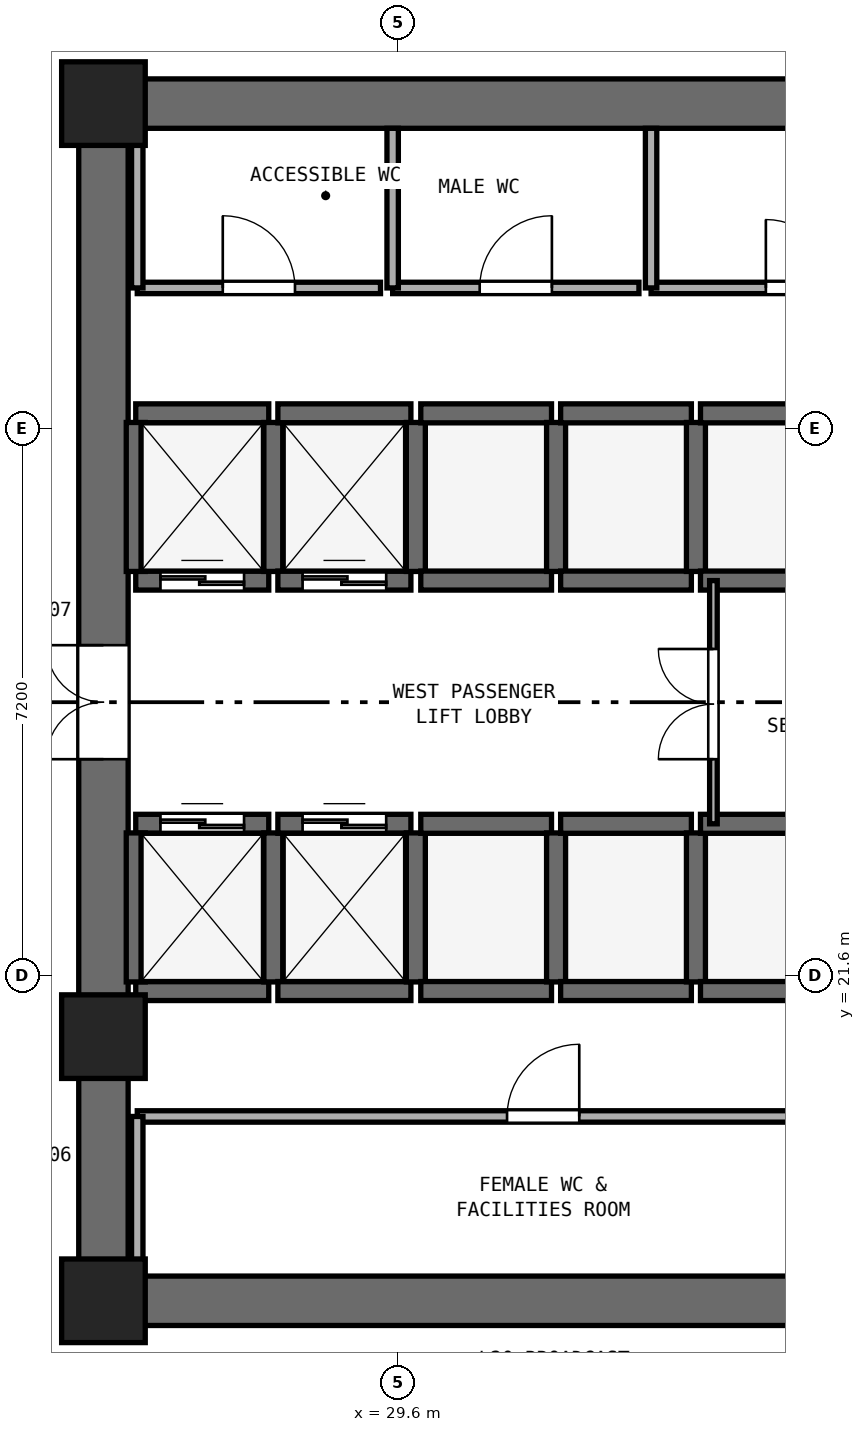
"""IFC4 building model, lengths in metres.
Left out: names, types, materials, properties, quantities, classifications, styles, units other than length and angle.
Written with IfcOpenShell. Run it as: python <this file> out.ifc"""

import sys

from ifc_helpers import new_model, si_unit, direction, frame, frame_2d, origin, origin_2d, place, context, subcontext, project, spatial, rectangle, extrude, element, fill, save


model = new_model("IFC4")
c1 = context("Model", 3, precision=1e-05, world=origin(), true_north=direction((0.0, 1.0)))
c2 = subcontext(c1, "Body", "Model", "MODEL_VIEW")
j1 = project(units=[si_unit("LENGTHUNIT", "METRE"), si_unit("PLANEANGLEUNIT", "RADIAN")], contexts=[c1])
p1 = place(None, origin())
s1 = spatial("IfcSite", under=j1, at=p1, CompositionType="ELEMENT")
p2 = place(p1, origin())
s2 = spatial("IfcBuilding", under=s1, at=p2, CompositionType="ELEMENT")
p3 = place(p2, frame((0.0, 0.0, 82.0)))
s3 = spatial("IfcBuildingStorey", under=s2, at=p3, CompositionType="ELEMENT", Elevation=82.0)
for number, where, z_axis, x_axis in (
    (1, (25.4, 17.325, 0.0), (0.0, 0.0, 1.0), (1.0, 0.0, 0.0)),
    (2, (25.4, 33.075, 0.0), (0.0, 0.0, 1.0), (1.0, 0.0, 0.0)),
):
    element("IfcWall", number, at=place(p3, frame(where, z_axis=z_axis, x_axis=x_axis)), inside=s3, PredefinedType="SHEAR", context=c2, shape_type="SweptSolid", body=[
        extrude(rectangle(XDim=23.2, YDim=0.65, at=frame_2d((11.6, 0.0))), origin(), (0.0, 0.0, 1.0), 3.525),
    ])
p4 = place(p3, frame((25.725, 17.65, 0.0), z_axis=(0.0, 0.0, 1.0), x_axis=(0.0, 1.0, 0.0)))
e3 = element("IfcWall", 3, at=p4, inside=s3, PredefinedType="SHEAR", context=c2, shape_type="SweptSolid", body=[
    extrude(rectangle(XDim=15.1, YDim=0.65, at=frame_2d((7.55, 0.0))), origin(), (0.0, 0.0, 1.0), 3.525),
])
p5 = place(p4, frame((6.8, 0.0, 0.0)))
e4 = element("IfcOpeningElement", 4, at=p5, cuts=e3, PredefinedType="OPENING", context=c2, shape_type="SweptSolid", body=[
    extrude(rectangle(XDim=1.5, YDim=2.15, at=frame_2d((0.75, 1.075))), frame((0.0, 0.335, 0.0), z_axis=(0.0, -1.0, 0.0), x_axis=(1.0, 0.0, 0.0)), (0.0, 0.0, 1.0), 0.67),
])
for number, where, z_axis, x_axis in (
    (5, (25.725, 17.325, 0.0), (0.0, 0.0, 1.0), (1.0, 0.0, 0.0)),
    (6, (25.725, 33.075, 0.0), (0.0, 0.0, 1.0), (1.0, 0.0, 0.0)),
    (7, (25.725, 20.8, 0.0), (0.0, 0.0, 1.0), (1.0, 0.0, 0.0)),
):
    element("IfcColumn", number, at=place(p3, frame(where, z_axis=z_axis, x_axis=x_axis)), inside=s3, PredefinedType="PILASTER", context=c2, shape_type="SweptSolid", body=[
        extrude(rectangle(XDim=1.1, YDim=1.1, at=origin_2d()), origin(), (0.0, 0.0, 1.0), 3.8),
    ])
p6 = place(p3, frame((26.15, 26.8, 0.0), z_axis=(0.0, 0.0, 1.0), x_axis=(1.0, 0.0, 0.0)))
e8 = element("IfcWall", 8, at=p6, inside=s3, PredefinedType="SHEAR", context=c2, shape_type="SweptSolid", body=[
    extrude(rectangle(XDim=1.75, YDim=0.25, at=frame_2d((0.875, 0.0))), origin(), (0.0, 0.0, 1.0), 3.525),
])
p7 = place(p6, frame((0.325, 0.0, 0.0)))
e9 = element("IfcOpeningElement", 9, at=p7, cuts=e8, PredefinedType="OPENING", context=c2, shape_type="SweptSolid", body=[
    extrude(rectangle(XDim=1.1, YDim=2.15, at=frame_2d((0.55, 1.075))), frame((0.0, 0.135, 0.0), z_axis=(0.0, -1.0, 0.0), x_axis=(1.0, 0.0, 0.0)), (0.0, 0.0, 1.0), 0.27),
])
p8 = place(p3, frame((26.15, 29.0, 0.0), z_axis=(0.0, 0.0, 1.0), x_axis=(1.0, 0.0, 0.0)))
e10 = element("IfcWall", 10, at=p8, inside=s3, PredefinedType="SHEAR", context=c2, shape_type="SweptSolid", body=[
    extrude(rectangle(XDim=1.75, YDim=0.25, at=frame_2d((0.875, 0.0))), origin(), (0.0, 0.0, 1.0), 3.525),
])
for number, where, z_axis, x_axis in (
    (11, (26.15, 26.92, 0.0), (0.0, 0.0, 1.0), (0.0, 1.0, 0.0)),
    (12, (27.96, 26.92, 0.0), (0.0, 0.0, 1.0), (0.0, 1.0, 0.0)),
):
    element("IfcWall", number, at=place(p3, frame(where, z_axis=z_axis, x_axis=x_axis)), inside=s3, PredefinedType="SHEAR", context=c2, shape_type="SweptSolid", body=[
        extrude(rectangle(XDim=1.96, YDim=0.25, at=frame_2d((0.98, 0.0))), origin(), (0.0, 0.0, 1.0), 3.525),
    ])
p9 = place(p3, frame((28.02, 26.8, 0.0), z_axis=(0.0, 0.0, 1.0), x_axis=(1.0, 0.0, 0.0)))
e13 = element("IfcWall", 13, at=p9, inside=s3, PredefinedType="SHEAR", context=c2, shape_type="SweptSolid", body=[
    extrude(rectangle(XDim=1.75, YDim=0.25, at=frame_2d((0.875, 0.0))), origin(), (0.0, 0.0, 1.0), 3.525),
])
p10 = place(p9, frame((0.325, 0.0, 0.0)))
e14 = element("IfcOpeningElement", 14, at=p10, cuts=e13, PredefinedType="OPENING", context=c2, shape_type="SweptSolid", body=[
    extrude(rectangle(XDim=1.1, YDim=2.15, at=frame_2d((0.55, 1.075))), frame((0.0, 0.135, 0.0), z_axis=(0.0, -1.0, 0.0), x_axis=(1.0, 0.0, 0.0)), (0.0, 0.0, 1.0), 0.27),
])
p11 = place(p3, frame((28.02, 29.0, 0.0), z_axis=(0.0, 0.0, 1.0), x_axis=(1.0, 0.0, 0.0)))
e15 = element("IfcWall", 15, at=p11, inside=s3, PredefinedType="SHEAR", context=c2, shape_type="SweptSolid", body=[
    extrude(rectangle(XDim=1.75, YDim=0.25, at=frame_2d((0.875, 0.0))), origin(), (0.0, 0.0, 1.0), 3.525),
])
p12 = place(p3, frame((29.835, 26.92, 0.0), z_axis=(0.0, 0.0, 1.0), x_axis=(0.0, 1.0, 0.0)))
e16 = element("IfcWall", 16, at=p12, inside=s3, PredefinedType="SHEAR", context=c2, shape_type="SweptSolid", body=[
    extrude(rectangle(XDim=1.96, YDim=0.25, at=frame_2d((0.98, 0.0))), origin(), (0.0, 0.0, 1.0), 3.525),
])
p13 = place(p3, frame((26.15, 21.4, 0.0), z_axis=(0.0, 0.0, 1.0), x_axis=(1.0, 0.0, 0.0)))
e17 = element("IfcWall", 17, at=p13, inside=s3, PredefinedType="SHEAR", context=c2, shape_type="SweptSolid", body=[
    extrude(rectangle(XDim=1.75, YDim=0.25, at=frame_2d((0.875, 0.0))), origin(), (0.0, 0.0, 1.0), 3.525),
])
p14 = place(p3, frame((26.15, 23.6, 0.0), z_axis=(0.0, 0.0, 1.0), x_axis=(1.0, 0.0, 0.0)))
e18 = element("IfcWall", 18, at=p14, inside=s3, PredefinedType="SHEAR", context=c2, shape_type="SweptSolid", body=[
    extrude(rectangle(XDim=1.75, YDim=0.25, at=frame_2d((0.875, 0.0))), origin(), (0.0, 0.0, 1.0), 3.525),
])
p15 = place(p14, frame((0.325, 0.0, 0.0)))
e19 = element("IfcOpeningElement", 19, at=p15, cuts=e18, PredefinedType="OPENING", context=c2, shape_type="SweptSolid", body=[
    extrude(rectangle(XDim=1.1, YDim=2.15, at=frame_2d((0.55, 1.075))), frame((0.0, 0.135, 0.0), z_axis=(0.0, -1.0, 0.0), x_axis=(1.0, 0.0, 0.0)), (0.0, 0.0, 1.0), 0.27),
])
for number, where, z_axis, x_axis in (
    (20, (26.15, 21.52, 0.0), (0.0, 0.0, 1.0), (0.0, 1.0, 0.0)),
    (21, (27.96, 21.52, 0.0), (0.0, 0.0, 1.0), (0.0, 1.0, 0.0)),
):
    element("IfcWall", number, at=place(p3, frame(where, z_axis=z_axis, x_axis=x_axis)), inside=s3, PredefinedType="SHEAR", context=c2, shape_type="SweptSolid", body=[
        extrude(rectangle(XDim=1.96, YDim=0.25, at=frame_2d((0.98, 0.0))), origin(), (0.0, 0.0, 1.0), 3.525),
    ])
p16 = place(p3, frame((28.02, 21.4, 0.0), z_axis=(0.0, 0.0, 1.0), x_axis=(1.0, 0.0, 0.0)))
e22 = element("IfcWall", 22, at=p16, inside=s3, PredefinedType="SHEAR", context=c2, shape_type="SweptSolid", body=[
    extrude(rectangle(XDim=1.75, YDim=0.25, at=frame_2d((0.875, 0.0))), origin(), (0.0, 0.0, 1.0), 3.525),
])
p17 = place(p3, frame((28.02, 23.6, 0.0), z_axis=(0.0, 0.0, 1.0), x_axis=(1.0, 0.0, 0.0)))
e23 = element("IfcWall", 23, at=p17, inside=s3, PredefinedType="SHEAR", context=c2, shape_type="SweptSolid", body=[
    extrude(rectangle(XDim=1.75, YDim=0.25, at=frame_2d((0.875, 0.0))), origin(), (0.0, 0.0, 1.0), 3.525),
])
p18 = place(p17, frame((0.325, 0.0, 0.0)))
e24 = element("IfcOpeningElement", 24, at=p18, cuts=e23, PredefinedType="OPENING", context=c2, shape_type="SweptSolid", body=[
    extrude(rectangle(XDim=1.1, YDim=2.15, at=frame_2d((0.55, 1.075))), frame((0.0, 0.135, 0.0), z_axis=(0.0, -1.0, 0.0), x_axis=(1.0, 0.0, 0.0)), (0.0, 0.0, 1.0), 0.27),
])
p19 = place(p3, frame((29.835, 21.52, 0.0), z_axis=(0.0, 0.0, 1.0), x_axis=(0.0, 1.0, 0.0)))
e25 = element("IfcWall", 25, at=p19, inside=s3, PredefinedType="SHEAR", context=c2, shape_type="SweptSolid", body=[
    extrude(rectangle(XDim=1.96, YDim=0.25, at=frame_2d((0.98, 0.0))), origin(), (0.0, 0.0, 1.0), 3.525),
])
for number, where, z_axis, x_axis in (
    (26, (29.9, 21.4, 0.0), (0.0, 0.0, 1.0), (1.0, 0.0, 0.0)),
    (27, (29.9, 23.6, 0.0), (0.0, 0.0, 1.0), (1.0, 0.0, 0.0)),
):
    element("IfcWall", number, at=place(p3, frame(where, z_axis=z_axis, x_axis=x_axis)), inside=s3, PredefinedType="SHEAR", context=c2, shape_type="SweptSolid", body=[
        extrude(rectangle(XDim=1.72, YDim=0.25, at=frame_2d((0.86, 0.0))), origin(), (0.0, 0.0, 1.0), 3.525),
    ])
p20 = place(p3, frame((31.68, 21.52, 0.0), z_axis=(0.0, 0.0, 1.0), x_axis=(0.0, 1.0, 0.0)))
e28 = element("IfcWall", 28, at=p20, inside=s3, PredefinedType="SHEAR", context=c2, shape_type="SweptSolid", body=[
    extrude(rectangle(XDim=1.96, YDim=0.25, at=frame_2d((0.98, 0.0))), origin(), (0.0, 0.0, 1.0), 3.525),
])
for number, where, z_axis, x_axis in (
    (29, (31.74, 21.4, 0.0), (0.0, 0.0, 1.0), (1.0, 0.0, 0.0)),
    (30, (31.74, 23.6, 0.0), (0.0, 0.0, 1.0), (1.0, 0.0, 0.0)),
):
    element("IfcWall", number, at=place(p3, frame(where, z_axis=z_axis, x_axis=x_axis)), inside=s3, PredefinedType="SHEAR", context=c2, shape_type="SweptSolid", body=[
        extrude(rectangle(XDim=1.72, YDim=0.25, at=frame_2d((0.86, 0.0))), origin(), (0.0, 0.0, 1.0), 3.525),
    ])
p21 = place(p3, frame((33.52, 21.52, 0.0), z_axis=(0.0, 0.0, 1.0), x_axis=(0.0, 1.0, 0.0)))
e31 = element("IfcWall", 31, at=p21, inside=s3, PredefinedType="SHEAR", context=c2, shape_type="SweptSolid", body=[
    extrude(rectangle(XDim=1.96, YDim=0.25, at=frame_2d((0.98, 0.0))), origin(), (0.0, 0.0, 1.0), 3.525),
])
for number, where, z_axis, x_axis in (
    (32, (33.58, 21.4, 0.0), (0.0, 0.0, 1.0), (1.0, 0.0, 0.0)),
    (33, (33.58, 23.6, 0.0), (0.0, 0.0, 1.0), (1.0, 0.0, 0.0)),
):
    element("IfcWall", number, at=place(p3, frame(where, z_axis=z_axis, x_axis=x_axis)), inside=s3, PredefinedType="SHEAR", context=c2, shape_type="SweptSolid", body=[
        extrude(rectangle(XDim=1.72, YDim=0.25, at=frame_2d((0.86, 0.0))), origin(), (0.0, 0.0, 1.0), 3.525),
    ])
for number, where, z_axis, x_axis in (
    (34, (29.9, 26.8, 0.0), (0.0, 0.0, 1.0), (1.0, 0.0, 0.0)),
    (35, (29.9, 29.0, 0.0), (0.0, 0.0, 1.0), (1.0, 0.0, 0.0)),
):
    element("IfcWall", number, at=place(p3, frame(where, z_axis=z_axis, x_axis=x_axis)), inside=s3, PredefinedType="SHEAR", context=c2, shape_type="SweptSolid", body=[
        extrude(rectangle(XDim=1.72, YDim=0.25, at=frame_2d((0.86, 0.0))), origin(), (0.0, 0.0, 1.0), 3.525),
    ])
p22 = place(p3, frame((31.68, 26.92, 0.0), z_axis=(0.0, 0.0, 1.0), x_axis=(0.0, 1.0, 0.0)))
e36 = element("IfcWall", 36, at=p22, inside=s3, PredefinedType="SHEAR", context=c2, shape_type="SweptSolid", body=[
    extrude(rectangle(XDim=1.96, YDim=0.25, at=frame_2d((0.98, 0.0))), origin(), (0.0, 0.0, 1.0), 3.525),
])
for number, where, z_axis, x_axis in (
    (37, (31.74, 26.8, 0.0), (0.0, 0.0, 1.0), (1.0, 0.0, 0.0)),
    (38, (31.74, 29.0, 0.0), (0.0, 0.0, 1.0), (1.0, 0.0, 0.0)),
):
    element("IfcWall", number, at=place(p3, frame(where, z_axis=z_axis, x_axis=x_axis)), inside=s3, PredefinedType="SHEAR", context=c2, shape_type="SweptSolid", body=[
        extrude(rectangle(XDim=1.72, YDim=0.25, at=frame_2d((0.86, 0.0))), origin(), (0.0, 0.0, 1.0), 3.525),
    ])
p23 = place(p3, frame((33.52, 26.92, 0.0), z_axis=(0.0, 0.0, 1.0), x_axis=(0.0, 1.0, 0.0)))
e39 = element("IfcWall", 39, at=p23, inside=s3, PredefinedType="SHEAR", context=c2, shape_type="SweptSolid", body=[
    extrude(rectangle(XDim=1.96, YDim=0.25, at=frame_2d((0.98, 0.0))), origin(), (0.0, 0.0, 1.0), 3.525),
])
for number, where, z_axis, x_axis in (
    (40, (33.58, 26.8, 0.0), (0.0, 0.0, 1.0), (1.0, 0.0, 0.0)),
    (41, (33.58, 29.0, 0.0), (0.0, 0.0, 1.0), (1.0, 0.0, 0.0)),
):
    element("IfcWall", number, at=place(p3, frame(where, z_axis=z_axis, x_axis=x_axis)), inside=s3, PredefinedType="SHEAR", context=c2, shape_type="SweptSolid", body=[
        extrude(rectangle(XDim=1.72, YDim=0.25, at=frame_2d((0.86, 0.0))), origin(), (0.0, 0.0, 1.0), 3.525),
    ])
p24 = place(p3, frame((26.17, 30.65, 0.0), z_axis=(0.0, 0.0, 1.0), x_axis=(1.0, 0.0, 0.0)))
e42 = element("IfcWall", 42, at=p24, inside=s3, PredefinedType="PARTITIONING", context=c2, shape_type="SweptSolid", body=[
    extrude(rectangle(XDim=3.2, YDim=0.15, at=frame_2d((1.6, 0.0))), origin(), (0.0, 0.0, 1.0), 3.525),
])
p25 = place(p24, frame((1.125, 0.0, 0.0)))
e43 = element("IfcOpeningElement", 43, at=p25, cuts=e42, PredefinedType="OPENING", context=c2, shape_type="SweptSolid", body=[
    extrude(rectangle(XDim=0.95, YDim=2.1, at=frame_2d((0.475, 1.05))), frame((0.0, 0.085, 0.0), z_axis=(0.0, -1.0, 0.0), x_axis=(1.0, 0.0, 0.0)), (0.0, 0.0, 1.0), 0.17),
])
p26 = place(p3, frame((26.17, 30.65, 0.0), z_axis=(0.0, 0.0, 1.0), x_axis=(0.0, 1.0, 0.0)))
e44 = element("IfcWall", 44, at=p26, inside=s3, PredefinedType="PARTITIONING", context=c2, shape_type="SweptSolid", body=[
    extrude(rectangle(XDim=2.1, YDim=0.15, at=frame_2d((1.05, 0.0))), origin(), (0.0, 0.0, 1.0), 3.525),
])
p27 = place(p3, frame((29.53, 30.65, 0.0), z_axis=(0.0, 0.0, 1.0), x_axis=(1.0, 0.0, 0.0)))
e45 = element("IfcWall", 45, at=p27, inside=s3, PredefinedType="PARTITIONING", context=c2, shape_type="SweptSolid", body=[
    extrude(rectangle(XDim=3.24, YDim=0.15, at=frame_2d((1.62, 0.0))), origin(), (0.0, 0.0, 1.0), 3.525),
])
p28 = place(p27, frame((1.145, 0.0, 0.0)))
e46 = element("IfcOpeningElement", 46, at=p28, cuts=e45, PredefinedType="OPENING", context=c2, shape_type="SweptSolid", body=[
    extrude(rectangle(XDim=0.95, YDim=2.1, at=frame_2d((0.475, 1.05))), frame((0.0, 0.085, 0.0), z_axis=(0.0, -1.0, 0.0), x_axis=(1.0, 0.0, 0.0)), (0.0, 0.0, 1.0), 0.17),
])
p29 = place(p3, frame((29.53, 30.65, 0.0), z_axis=(0.0, 0.0, 1.0), x_axis=(0.0, 1.0, 0.0)))
e47 = element("IfcWall", 47, at=p29, inside=s3, PredefinedType="PARTITIONING", context=c2, shape_type="SweptSolid", body=[
    extrude(rectangle(XDim=2.1, YDim=0.15, at=frame_2d((1.05, 0.0))), origin(), (0.0, 0.0, 1.0), 3.525),
])
p30 = place(p3, frame((32.93, 30.65, 0.0), z_axis=(0.0, 0.0, 1.0), x_axis=(1.0, 0.0, 0.0)))
e48 = element("IfcWall", 48, at=p30, inside=s3, PredefinedType="PARTITIONING", context=c2, shape_type="SweptSolid", body=[
    extrude(rectangle(XDim=3.92, YDim=0.15, at=frame_2d((1.96, 0.0))), origin(), (0.0, 0.0, 1.0), 3.525),
])
p31 = place(p30, frame((1.51, 0.0, 0.0)))
e49 = element("IfcOpeningElement", 49, at=p31, cuts=e48, PredefinedType="OPENING", context=c2, shape_type="SweptSolid", body=[
    extrude(rectangle(XDim=0.9, YDim=2.1, at=frame_2d((0.45, 1.05))), frame((0.0, 0.085, 0.0), z_axis=(0.0, -1.0, 0.0), x_axis=(1.0, 0.0, 0.0)), (0.0, 0.0, 1.0), 0.17),
])
p32 = place(p3, frame((32.93, 30.65, 0.0), z_axis=(0.0, 0.0, 1.0), x_axis=(0.0, 1.0, 0.0)))
e50 = element("IfcWall", 50, at=p32, inside=s3, PredefinedType="PARTITIONING", context=c2, shape_type="SweptSolid", body=[
    extrude(rectangle(XDim=2.1, YDim=0.15, at=frame_2d((1.05, 0.0))), origin(), (0.0, 0.0, 1.0), 3.525),
])
p33 = place(p3, frame((26.17, 19.75, 0.0), z_axis=(0.0, 0.0, 1.0), x_axis=(1.0, 0.0, 0.0)))
e51 = element("IfcWall", 51, at=p33, inside=s3, PredefinedType="PARTITIONING", context=c2, shape_type="SweptSolid", body=[
    extrude(rectangle(XDim=10.68, YDim=0.15, at=frame_2d((5.34, 0.0))), origin(), (0.0, 0.0, 1.0), 3.525),
])
p34 = place(p33, frame((4.865, 0.0, 0.0)))
e52 = element("IfcOpeningElement", 52, at=p34, cuts=e51, PredefinedType="OPENING", context=c2, shape_type="SweptSolid", body=[
    extrude(rectangle(XDim=0.95, YDim=2.1, at=frame_2d((0.475, 1.05))), frame((0.0, 0.085, 0.0), z_axis=(0.0, -1.0, 0.0), x_axis=(1.0, 0.0, 0.0)), (0.0, 0.0, 1.0), 0.17),
])
p35 = place(p3, frame((26.17, 17.65, 0.0), z_axis=(0.0, 0.0, 1.0), x_axis=(0.0, 1.0, 0.0)))
e53 = element("IfcWall", 53, at=p35, inside=s3, PredefinedType="PARTITIONING", context=c2, shape_type="SweptSolid", body=[
    extrude(rectangle(XDim=2.1, YDim=0.15, at=frame_2d((1.05, 0.0))), origin(), (0.0, 0.0, 1.0), 3.525),
])
p36 = place(p3, frame((33.75, 23.6, 0.0), z_axis=(0.0, 0.0, 1.0), x_axis=(0.0, 1.0, 0.0)))
e54 = element("IfcWall", 54, at=p36, inside=s3, PredefinedType="PARTITIONING", context=c2, shape_type="SweptSolid", body=[
    extrude(rectangle(XDim=3.2, YDim=0.1, at=frame_2d((1.6, 0.0))), origin(), (0.0, 0.0, 1.0), 3.525),
])
p37 = place(p36, frame((0.85, 0.0, 0.0)))
e55 = element("IfcOpeningElement", 55, at=p37, cuts=e54, PredefinedType="OPENING", context=c2, shape_type="SweptSolid", body=[
    extrude(rectangle(XDim=1.45, YDim=2.12, at=frame_2d((0.725, 1.06))), frame((0.0, 0.06, 0.0), z_axis=(0.0, -1.0, 0.0), x_axis=(1.0, 0.0, 0.0)), (0.0, 0.0, 1.0), 0.12),
])
p38 = place(p7, origin())
e56 = element("IfcDoor", 56, at=p38, inside=s3, OperationType="DOUBLE_DOOR_SLIDING", PredefinedType="DOOR", context=c2, shape_type="SweptSolid", body=[
    extrude(rectangle(XDim=1.1, YDim=2.15, at=frame_2d((0.55, 1.075))), frame((0.0, 0.025, 0.0), z_axis=(0.0, -1.0, 0.0), x_axis=(1.0, 0.0, 0.0)), (0.0, 0.0, 1.0), 0.05),
])
fill(e9, e56)
p39 = place(p10, origin())
e57 = element("IfcDoor", 57, at=p39, inside=s3, OperationType="DOUBLE_DOOR_SLIDING", PredefinedType="DOOR", context=c2, shape_type="SweptSolid", body=[
    extrude(rectangle(XDim=1.1, YDim=2.15, at=frame_2d((0.55, 1.075))), frame((0.0, 0.025, 0.0), z_axis=(0.0, -1.0, 0.0), x_axis=(1.0, 0.0, 0.0)), (0.0, 0.0, 1.0), 0.05),
])
fill(e14, e57)
p40 = place(p15, origin())
e58 = element("IfcDoor", 58, at=p40, inside=s3, OperationType="DOUBLE_DOOR_SLIDING", PredefinedType="DOOR", context=c2, shape_type="SweptSolid", body=[
    extrude(rectangle(XDim=1.1, YDim=2.15, at=frame_2d((0.55, 1.075))), frame((0.0, 0.025, 0.0), z_axis=(0.0, -1.0, 0.0), x_axis=(1.0, 0.0, 0.0)), (0.0, 0.0, 1.0), 0.05),
])
fill(e19, e58)
p41 = place(p18, origin())
e59 = element("IfcDoor", 59, at=p41, inside=s3, OperationType="DOUBLE_DOOR_SLIDING", PredefinedType="DOOR", context=c2, shape_type="SweptSolid", body=[
    extrude(rectangle(XDim=1.1, YDim=2.15, at=frame_2d((0.55, 1.075))), frame((0.0, 0.025, 0.0), z_axis=(0.0, -1.0, 0.0), x_axis=(1.0, 0.0, 0.0)), (0.0, 0.0, 1.0), 0.05),
])
fill(e24, e59)
p42 = place(p5, origin())
e60 = element("IfcDoor", 60, at=p42, inside=s3, OperationType="DOUBLE_DOOR_SINGLE_SWING", PredefinedType="DOOR", context=c2, shape_type="SweptSolid", body=[
    extrude(rectangle(XDim=1.5, YDim=2.15, at=frame_2d((0.75, 1.075))), frame((0.0, 0.025, 0.0), z_axis=(0.0, -1.0, 0.0), x_axis=(1.0, 0.0, 0.0)), (0.0, 0.0, 1.0), 0.05),
])
fill(e4, e60)
p43 = place(p25, origin())
e61 = element("IfcDoor", 61, at=p43, inside=s3, OperationType="SINGLE_SWING_LEFT", PredefinedType="DOOR", context=c2, shape_type="SweptSolid", body=[
    extrude(rectangle(XDim=0.95, YDim=2.1, at=frame_2d((0.475, 1.05))), frame((0.0, 0.025, 0.0), z_axis=(0.0, -1.0, 0.0), x_axis=(1.0, 0.0, 0.0)), (0.0, 0.0, 1.0), 0.05),
])
fill(e43, e61)
p44 = place(p28, origin())
e62 = element("IfcDoor", 62, at=p44, inside=s3, OperationType="SINGLE_SWING_RIGHT", PredefinedType="DOOR", context=c2, shape_type="SweptSolid", body=[
    extrude(rectangle(XDim=0.95, YDim=2.1, at=frame_2d((0.475, 1.05))), frame((0.0, 0.025, 0.0), z_axis=(0.0, -1.0, 0.0), x_axis=(1.0, 0.0, 0.0)), (0.0, 0.0, 1.0), 0.05),
])
fill(e46, e62)
p45 = place(p31, origin())
e63 = element("IfcDoor", 63, at=p45, inside=s3, OperationType="SINGLE_SWING_LEFT", PredefinedType="DOOR", context=c2, shape_type="SweptSolid", body=[
    extrude(rectangle(XDim=0.9, YDim=2.1, at=frame_2d((0.45, 1.05))), frame((0.0, 0.025, 0.0), z_axis=(0.0, -1.0, 0.0), x_axis=(1.0, 0.0, 0.0)), (0.0, 0.0, 1.0), 0.05),
])
fill(e49, e63)
p46 = place(p34, origin())
e64 = element("IfcDoor", 64, at=p46, inside=s3, OperationType="SINGLE_SWING_RIGHT", PredefinedType="DOOR", context=c2, shape_type="SweptSolid", body=[
    extrude(rectangle(XDim=0.95, YDim=2.1, at=frame_2d((0.475, 1.05))), frame((0.0, 0.025, 0.0), z_axis=(0.0, -1.0, 0.0), x_axis=(1.0, 0.0, 0.0)), (0.0, 0.0, 1.0), 0.05),
])
fill(e52, e64)
p47 = place(p37, origin())
e65 = element("IfcDoor", 65, at=p47, inside=s3, OperationType="DOUBLE_DOOR_SINGLE_SWING", PredefinedType="DOOR", context=c2, shape_type="SweptSolid", body=[
    extrude(rectangle(XDim=1.45, YDim=2.12, at=frame_2d((0.725, 1.06))), frame((0.0, 0.025, 0.0), z_axis=(0.0, -1.0, 0.0), x_axis=(1.0, 0.0, 0.0)), (0.0, 0.0, 1.0), 0.05),
])
fill(e55, e65)
save(model, sys.argv[1])
